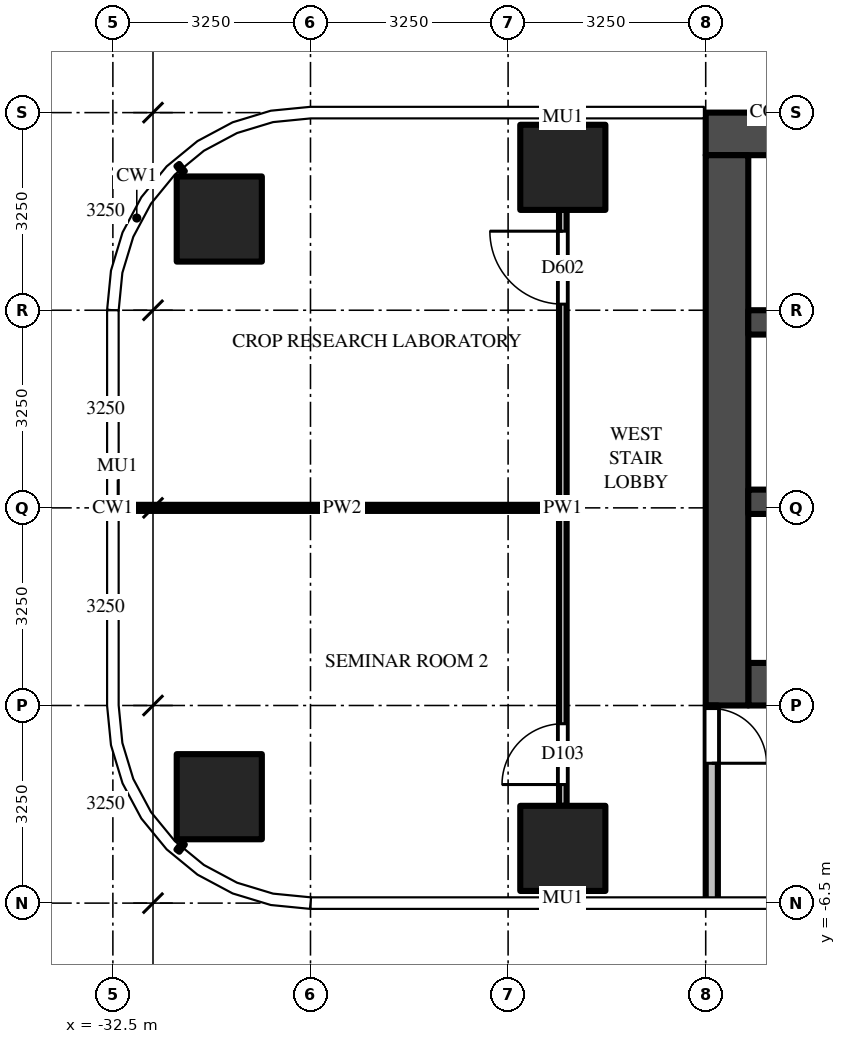
"""IFC4 building model, lengths in metres.
Left out: names, types, materials, properties, quantities, classifications, styles, units other than length and angle.
Written with IfcOpenShell. Run it as: python <this file> out.ifc"""

import sys

from ifc_helpers import new_model, si_unit, direction, frame, frame_2d, origin, origin_2d, place, context, subcontext, project, spatial, rectangle, extrude, source, transform, mapped, element, fill, save


model = new_model("IFC4")
c1 = context("Model", 3, precision=1e-05, world=origin(), true_north=direction((0.0, 1.0)))
c2 = subcontext(c1, "Body", "Model", "MODEL_VIEW")
j1 = project(units=[si_unit("LENGTHUNIT", "METRE"), si_unit("PLANEANGLEUNIT", "RADIAN")], contexts=[c1])
p1 = place(None, origin())
s1 = spatial("IfcSite", under=j1, at=p1, CompositionType="ELEMENT")
p2 = place(p1, origin())
s2 = spatial("IfcBuilding", under=s1, at=p2, CompositionType="ELEMENT")
p3 = place(p2, frame((0.0, 0.0, 83.5)))
s3 = spatial("IfcBuildingStorey", under=s2, at=p3, CompositionType="ELEMENT", Elevation=83.5)
m1 = source(origin(), c2, "Body", "SweptSolid", [
    extrude(rectangle(XDim=1.4, YDim=1.4, at=origin_2d()), origin(), (0.0, 0.0, 1.0), 4.5),
])
for number, where, z_axis, x_axis in (
    (1, (-25.1, -5.6, 0.0), (0.0, 0.0, 1.0), (1.0, 0.0, 0.0)),
    (2, (-30.75, -4.75, 0.0), (0.0, 0.0, 1.0), (1.0, 0.0, 0.0)),
    (3, (-25.1, 5.6, 0.0), (0.0, 0.0, 1.0), (1.0, 0.0, 0.0)),
    (4, (-30.75, 4.75, 0.0), (0.0, 0.0, 1.0), (1.0, 0.0, 0.0)),
):
    element("IfcColumn", number, at=place(p3, frame(where, z_axis=z_axis, x_axis=x_axis)), inside=s3, PredefinedType="COLUMN", context=c2, shape_type="MappedRepresentation", body=[
        mapped(m1, transform((0.0, 0.0, 0.0))),
    ])
m2 = source(origin(), c2, "Body", "SweptSolid", [
    extrude(rectangle(XDim=16.45, YDim=0.7, at=frame_2d((8.225, 0.0))), origin(), (0.0, 0.0, 1.0), 4.25),
])
p4 = place(p3, frame((-6.3, 6.15, 0.0), z_axis=(0.0, 0.0, 1.0), x_axis=(-1.0, 0.0, 0.0)))
e5 = element("IfcWall", 5, at=p4, inside=s3, PredefinedType="SHEAR", context=c2, shape_type="MappedRepresentation", body=[
    mapped(m2, transform((0.0, 0.0, 0.0))),
])
m3 = source(origin(), c2, "Body", "SweptSolid", [
    extrude(rectangle(XDim=14.85, YDim=0.7, at=frame_2d((7.425, 0.0))), origin(), (0.0, 0.0, 1.0), 4.25),
])
p5 = place(p3, frame((-7.2, -2.9, 0.0), z_axis=(0.0, 0.0, 1.0), x_axis=(-1.0, 0.0, 0.0)))
e6 = element("IfcWall", 6, at=p5, inside=s3, PredefinedType="SHEAR", context=c2, shape_type="MappedRepresentation", body=[
    mapped(m3, transform((0.0, 0.0, 0.0))),
])
m4 = source(origin(), c2, "Body", "SweptSolid", [
    extrude(rectangle(XDim=1.3, YDim=2.1, at=frame_2d((0.65, 1.05))), frame((0.0, 0.36, 0.0), z_axis=(0.0, -1.0, 0.0), x_axis=(1.0, 0.0, 0.0)), (0.0, 0.0, 1.0), 0.72),
])
p6 = place(p5, frame((12.2, 0.0, 0.0)))
e7 = element("IfcOpeningElement", 7, at=p6, cuts=e6, PredefinedType="OPENING", context=c2, shape_type="MappedRepresentation", body=[
    mapped(m4, transform((0.0, 0.0, 0.0))),
])
m5 = source(origin(), c2, "Body", "SweptSolid", [
    extrude(rectangle(XDim=1.2, YDim=2.1, at=frame_2d((0.6, 1.05))), frame((0.0, 0.36, 0.0), z_axis=(0.0, -1.0, 0.0), x_axis=(1.0, 0.0, 0.0)), (0.0, 0.0, 1.0), 0.72),
])
p7 = place(p5, frame((9.85, 0.0, 0.0)))
e8 = element("IfcOpeningElement", 8, at=p7, cuts=e6, PredefinedType="OPENING", context=c2, shape_type="MappedRepresentation", body=[
    mapped(m5, transform((0.0, 0.0, 0.0))),
])
m6 = source(origin(), c2, "Body", "SweptSolid", [
    extrude(rectangle(XDim=1.0, YDim=2.1, at=frame_2d((0.5, 1.05))), frame((0.0, 0.36, 0.0), z_axis=(0.0, -1.0, 0.0), x_axis=(1.0, 0.0, 0.0)), (0.0, 0.0, 1.0), 0.72),
])
p8 = place(p5, frame((7.9, 0.0, 0.0)))
e9 = element("IfcOpeningElement", 9, at=p8, cuts=e6, PredefinedType="OPENING", context=c2, shape_type="MappedRepresentation", body=[
    mapped(m6, transform((0.0, 0.0, 0.0))),
])
m7 = source(origin(), c2, "Body", "SweptSolid", [
    extrude(rectangle(XDim=0.8, YDim=2.1, at=frame_2d((0.4, 1.05))), frame((0.0, 0.36, 0.0), z_axis=(0.0, -1.0, 0.0), x_axis=(1.0, 0.0, 0.0)), (0.0, 0.0, 1.0), 0.72),
])
p9 = place(p5, frame((0.113, 0.0, 0.0)))
e10 = element("IfcOpeningElement", 10, at=p9, cuts=e6, PredefinedType="OPENING", context=c2, shape_type="MappedRepresentation", body=[
    mapped(m7, transform((0.0, 0.0, 0.0))),
])
p10 = place(p5, frame((1.288, 0.0, 0.0)))
e11 = element("IfcOpeningElement", 11, at=p10, cuts=e6, PredefinedType="OPENING", context=c2, shape_type="MappedRepresentation", body=[
    mapped(m7, transform((0.0, 0.0, 0.0))),
])
p11 = place(p5, frame((2.712, 0.0, 0.0)))
e12 = element("IfcOpeningElement", 12, at=p11, cuts=e6, PredefinedType="OPENING", context=c2, shape_type="MappedRepresentation", body=[
    mapped(m7, transform((0.0, 0.0, 0.0))),
])
p12 = place(p5, frame((3.887, 0.0, 0.0)))
e13 = element("IfcOpeningElement", 13, at=p12, cuts=e6, PredefinedType="OPENING", context=c2, shape_type="MappedRepresentation", body=[
    mapped(m7, transform((0.0, 0.0, 0.0))),
])
p13 = place(p5, frame((5.312, 0.0, 0.0)))
e14 = element("IfcOpeningElement", 14, at=p13, cuts=e6, PredefinedType="OPENING", context=c2, shape_type="MappedRepresentation", body=[
    mapped(m7, transform((0.0, 0.0, 0.0))),
])
p14 = place(p5, frame((6.488, 0.0, 0.0)))
e15 = element("IfcOpeningElement", 15, at=p14, cuts=e6, PredefinedType="OPENING", context=c2, shape_type="MappedRepresentation", body=[
    mapped(m7, transform((0.0, 0.0, 0.0))),
])
m8 = source(origin(), c2, "Body", "SweptSolid", [
    extrude(rectangle(XDim=9.05, YDim=0.7, at=frame_2d((4.525, 0.0))), origin(), (0.0, 0.0, 1.0), 4.25),
])
p15 = place(p3, frame((-22.4, 5.8, 0.0), z_axis=(0.0, 0.0, 1.0), x_axis=(0.0, -1.0, 0.0)))
e16 = element("IfcWall", 16, at=p15, inside=s3, PredefinedType="SHEAR", context=c2, shape_type="MappedRepresentation", body=[
    mapped(m8, transform((0.0, 0.0, 0.0))),
])
m9 = source(origin(), c2, "Body", "SweptSolid", [
    extrude(rectangle(XDim=14.85, YDim=0.4, at=frame_2d((7.425, 0.0))), origin(), (0.0, 0.0, 1.0), 4.25),
])
p16 = place(p3, frame((-7.2, 0.1, 0.0), z_axis=(0.0, 0.0, 1.0), x_axis=(-1.0, 0.0, 0.0)))
e17 = element("IfcWall", 17, at=p16, inside=s3, PredefinedType="SHEAR", context=c2, shape_type="MappedRepresentation", body=[
    mapped(m9, transform((0.0, 0.0, 0.0))),
])
m10 = source(origin(), c2, "Body", "SweptSolid", [
    extrude(rectangle(XDim=1.0, YDim=2.1, at=frame_2d((0.5, 1.05))), frame((0.0, 0.21, 0.0), z_axis=(0.0, -1.0, 0.0), x_axis=(1.0, 0.0, 0.0)), (0.0, 0.0, 1.0), 0.42),
])
p17 = place(p16, frame((7.9, 0.0, 0.0)))
e18 = element("IfcOpeningElement", 18, at=p17, cuts=e17, PredefinedType="OPENING", context=c2, shape_type="MappedRepresentation", body=[
    mapped(m10, transform((0.0, 0.0, 0.0))),
])
m11 = source(origin(), c2, "Body", "SweptSolid", [
    extrude(rectangle(XDim=5.7, YDim=0.4, at=frame_2d((2.85, 0.0))), origin(), (0.0, 0.0, 1.0), 4.25),
])
p18 = place(p3, frame((-16.35, 3.05, 0.0), z_axis=(0.0, 0.0, 1.0), x_axis=(-1.0, 0.0, 0.0)))
e19 = element("IfcWall", 19, at=p18, inside=s3, PredefinedType="SHEAR", context=c2, shape_type="MappedRepresentation", body=[
    mapped(m11, transform((0.0, 0.0, 0.0))),
])
m12 = source(origin(), c2, "Body", "SweptSolid", [
    extrude(rectangle(XDim=3.25, YDim=0.2, at=frame_2d((1.625, 0.0))), origin(), (0.0, 0.0, 1.0), 4.25),
])
p19 = place(p3, frame((-22.65, -3.25, 0.0), z_axis=(0.0, 0.0, 1.0), x_axis=(0.0, -1.0, 0.0)))
e20 = element("IfcWall", 20, at=p19, inside=s3, PredefinedType="PARTITIONING", context=c2, shape_type="MappedRepresentation", body=[
    mapped(m12, transform((0.0, 0.0, 0.0))),
])
m13 = source(origin(), c2, "Body", "SweptSolid", [
    extrude(rectangle(XDim=0.9, YDim=2.1, at=frame_2d((0.45, 1.05))), frame((0.0, 0.11, 0.0), z_axis=(0.0, -1.0, 0.0), x_axis=(1.0, 0.0, 0.0)), (0.0, 0.0, 1.0), 0.22),
])
p20 = place(p19, frame((0.05, 0.0, 0.0)))
e21 = element("IfcOpeningElement", 21, at=p20, cuts=e20, PredefinedType="OPENING", context=c2, shape_type="MappedRepresentation", body=[
    mapped(m13, transform((0.0, 0.0, 0.0))),
])
m14 = source(origin(), c2, "Body", "SweptSolid", [
    extrude(rectangle(XDim=9.8, YDim=0.125, at=frame_2d((4.9, 0.0))), origin(), (0.0, 0.0, 1.0), 3.468),
])
p21 = place(p3, frame((-25.1, -4.9, 0.0), z_axis=(0.0, 0.0, 1.0), x_axis=(0.0, 1.0, 0.0)))
e22 = element("IfcWall", 22, at=p21, inside=s3, PredefinedType="PARTITIONING", context=c2, shape_type="MappedRepresentation", body=[
    mapped(m14, transform((0.0, 0.0, 0.0))),
])
m15 = source(origin(), c2, "Body", "SweptSolid", [
    extrude(rectangle(XDim=1.0, YDim=2.1, at=frame_2d((0.5, 1.05))), frame((0.0, 0.073, 0.0), z_axis=(0.0, -1.0, 0.0), x_axis=(1.0, 0.0, 0.0)), (0.0, 0.0, 1.0), 0.145),
])
p22 = place(p21, frame((0.35, 0.0, 0.0)))
e23 = element("IfcOpeningElement", 23, at=p22, cuts=e22, PredefinedType="OPENING", context=c2, shape_type="MappedRepresentation", body=[
    mapped(m15, transform((0.0, 0.0, 0.0))),
])
m16 = source(origin(), c2, "Body", "SweptSolid", [
    extrude(rectangle(XDim=1.2, YDim=2.1, at=frame_2d((0.6, 1.05))), frame((0.0, 0.073, 0.0), z_axis=(0.0, -1.0, 0.0), x_axis=(1.0, 0.0, 0.0)), (0.0, 0.0, 1.0), 0.145),
])
p23 = place(p21, frame((8.25, 0.0, 0.0)))
e24 = element("IfcOpeningElement", 24, at=p23, cuts=e22, PredefinedType="OPENING", context=c2, shape_type="MappedRepresentation", body=[
    mapped(m16, transform((0.0, 0.0, 0.0))),
])
m17 = source(origin(), c2, "Body", "SweptSolid", [
    extrude(rectangle(XDim=7.137, YDim=0.1, at=frame_2d((3.569, 0.0))), origin(), (0.0, 0.0, 1.0), 3.33),
])
p24 = place(p3, frame((-32.3, 0.0, 0.0), z_axis=(0.0, 0.0, 1.0), x_axis=(1.0, 0.0, 0.0)))
e25 = element("IfcWall", 25, at=p24, inside=s3, PredefinedType="PARTITIONING", context=c2, shape_type="MappedRepresentation", body=[
    mapped(m17, transform((0.0, 0.0, 0.0))),
])
m18 = source(origin(), c2, "Body", "SweptSolid", [
    extrude(rectangle(XDim=0.9, YDim=2.1, at=frame_2d((0.45, 1.05))), frame((0.0, 0.025, 0.0), z_axis=(0.0, -1.0, 0.0), x_axis=(1.0, 0.0, 0.0)), (0.0, 0.0, 1.0), 0.05),
])
p25 = place(p20, origin())
e26 = element("IfcDoor", 26, at=p25, inside=s3, OperationType="SINGLE_SWING_RIGHT", PredefinedType="DOOR", context=c2, shape_type="MappedRepresentation", body=[
    mapped(m18, transform((0.0, 0.0, 0.0))),
])
fill(e21, e26)
m19 = source(origin(), c2, "Body", "SweptSolid", [
    extrude(rectangle(XDim=1.0, YDim=2.1, at=frame_2d((0.5, 1.05))), frame((0.0, 0.025, 0.0), z_axis=(0.0, -1.0, 0.0), x_axis=(1.0, 0.0, 0.0)), (0.0, 0.0, 1.0), 0.05),
])
p26 = place(p22, origin())
e27 = element("IfcDoor", 27, at=p26, inside=s3, OperationType="SINGLE_SWING_LEFT", PredefinedType="DOOR", context=c2, shape_type="MappedRepresentation", body=[
    mapped(m19, transform((0.0, 0.0, 0.0))),
])
fill(e23, e27)
m20 = source(origin(), c2, "Body", "SweptSolid", [
    extrude(rectangle(XDim=1.2, YDim=2.1, at=frame_2d((0.6, 1.05))), frame((0.0, 0.025, 0.0), z_axis=(0.0, -1.0, 0.0), x_axis=(1.0, 0.0, 0.0)), (0.0, 0.0, 1.0), 0.05),
])
p27 = place(p23, origin())
e28 = element("IfcDoor", 28, at=p27, inside=s3, OperationType="SINGLE_SWING_RIGHT", PredefinedType="DOOR", context=c2, shape_type="MappedRepresentation", body=[
    mapped(m20, transform((0.0, 0.0, 0.0))),
])
fill(e24, e28)
save(model, sys.argv[1])
